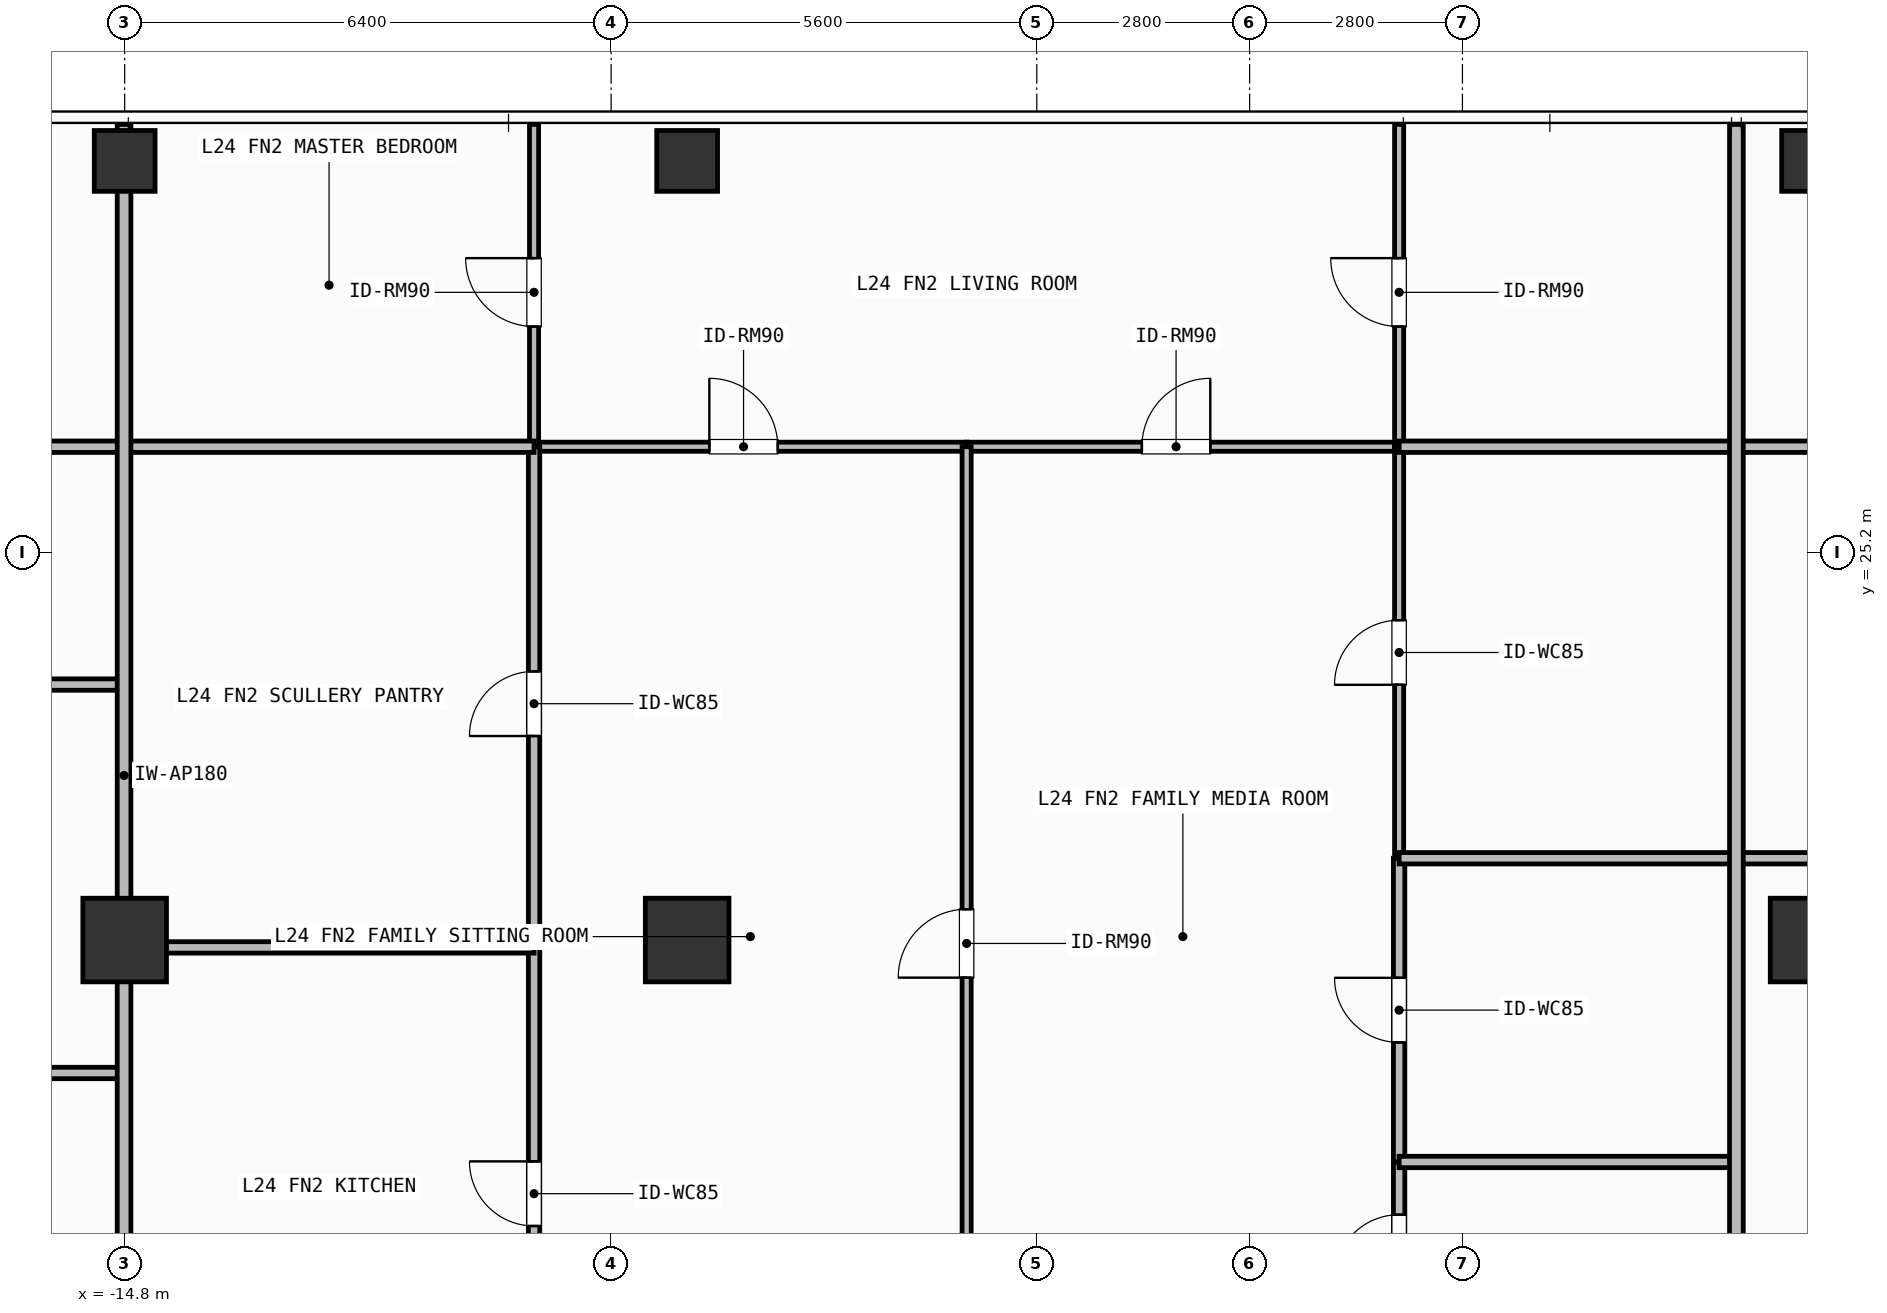
"""IFC4 building model, lengths in metres.
Left out: names, types, materials, properties, quantities, classifications, styles, units other than length and angle.
Written with IfcOpenShell. Run it as: python <this file> out.ifc"""

import sys

from ifc_helpers import new_model, si_unit, direction, frame, frame_2d, origin, origin_2d, place, context, subcontext, project, spatial, rectangle, hollow_rectangle, extrude, element, fill, save


model = new_model("IFC4")
c1 = context("Model", 3, precision=1e-05, world=origin(), true_north=direction((0.0, 1.0)))
c2 = subcontext(c1, "Body", "Model", "MODEL_VIEW")
j1 = project(units=[si_unit("LENGTHUNIT", "METRE"), si_unit("PLANEANGLEUNIT", "RADIAN")], contexts=[c1])
p1 = place(None, origin())
s1 = spatial("IfcSite", under=j1, at=p1, CompositionType="ELEMENT")
p2 = place(p1, origin())
s2 = spatial("IfcBuilding", under=s1, at=p2, CompositionType="ELEMENT")
p3 = place(p2, frame((0.0, 0.0, 96.9)))
s3 = spatial("IfcBuildingStorey", under=s2, at=p3, CompositionType="ELEMENT", Elevation=96.9)
for number, where, z_axis, x_axis in (
    (1, (-14.8, 20.1, 0.0), (0.0, 0.0, 1.0), (1.0, 0.0, 0.0)),
    (2, (-7.4, 20.1, 0.0), (0.0, 0.0, 1.0), (1.0, 0.0, 0.0)),
    (3, (7.4, 20.1, 0.0), (0.0, 0.0, 1.0), (1.0, 0.0, 0.0)),
):
    element("IfcColumn", number, at=place(p3, frame(where, z_axis=z_axis, x_axis=x_axis)), inside=s3, PredefinedType="COLUMN", context=c2, shape_type="SweptSolid", body=[
        extrude(rectangle(XDim=1.1, YDim=1.1, at=origin_2d()), origin(), (0.0, 0.0, 1.0), 3.9),
    ])
for number, where, z_axis, x_axis in (
    (4, (-14.8, 30.35, 0.0), (0.0, 0.0, 1.0), (1.0, 0.0, 0.0)),
    (5, (-7.4, 30.35, 0.0), (0.0, 0.0, 1.0), (1.0, 0.0, 0.0)),
    (6, (7.4, 30.35, 0.0), (0.0, 0.0, 1.0), (1.0, 0.0, 0.0)),
):
    element("IfcColumn", number, at=place(p3, frame(where, z_axis=z_axis, x_axis=x_axis)), inside=s3, PredefinedType="COLUMN", context=c2, shape_type="SweptSolid", body=[
        extrude(hollow_rectangle(XDim=0.8, YDim=0.8, WallThickness=0.036, at=origin_2d()), origin(), (0.0, 0.0, 1.0), 3.9),
    ])
p4 = place(p3, frame((-9.414, 26.59, 0.0), z_axis=(0.0, 0.0, 1.0), x_axis=(1.0, 0.0, 0.0)))
e7 = element("IfcWall", 7, at=p4, inside=s3, PredefinedType="PARTITIONING", context=c2, shape_type="SweptSolid", body=[
    extrude(rectangle(XDim=5.691, YDim=0.12, at=frame_2d((2.846, 0.0))), origin(), (0.0, 0.0, 1.0), 3.68),
])
p5 = place(p4, frame((2.306, 0.0, 0.0)))
e8 = element("IfcOpeningElement", 8, at=p5, cuts=e7, PredefinedType="OPENING", context=c2, shape_type="SweptSolid", body=[
    extrude(rectangle(XDim=0.9, YDim=2.1, at=frame_2d((0.45, 1.05))), frame((0.0, 0.07, 0.0), z_axis=(0.0, -1.0, 0.0), x_axis=(1.0, 0.0, 0.0)), (0.0, 0.0, 1.0), 0.14),
])
p6 = place(p3, frame((-3.723, 26.59, 0.0), z_axis=(0.0, 0.0, 1.0), x_axis=(1.0, 0.0, 0.0)))
e9 = element("IfcWall", 9, at=p6, inside=s3, PredefinedType="PARTITIONING", context=c2, shape_type="SweptSolid", body=[
    extrude(rectangle(XDim=5.69, YDim=0.12, at=frame_2d((2.845, 0.0))), origin(), (0.0, 0.0, 1.0), 3.68),
])
p7 = place(p6, frame((2.306, 0.0, 0.0)))
e10 = element("IfcOpeningElement", 10, at=p7, cuts=e9, PredefinedType="OPENING", context=c2, shape_type="SweptSolid", body=[
    extrude(rectangle(XDim=0.9, YDim=2.1, at=frame_2d((0.45, 1.05))), frame((0.0, 0.07, 0.0), z_axis=(0.0, -1.0, 0.0), x_axis=(1.0, 0.0, 0.0)), (0.0, 0.0, 1.0), 0.14),
])
p8 = place(p3, frame((-3.723, 13.7, 0.0), z_axis=(0.0, 0.0, 1.0), x_axis=(0.0, 1.0, 0.0)))
e11 = element("IfcWall", 11, at=p8, inside=s3, PredefinedType="PARTITIONING", context=c2, shape_type="SweptSolid", body=[
    extrude(rectangle(XDim=12.89, YDim=0.12, at=frame_2d((6.445, 0.0))), origin(), (0.0, 0.0, 1.0), 3.68),
])
p9 = place(p8, frame((5.905, 0.0, 0.0)))
e12 = element("IfcOpeningElement", 12, at=p9, cuts=e11, PredefinedType="OPENING", context=c2, shape_type="SweptSolid", body=[
    extrude(rectangle(XDim=0.9, YDim=2.1, at=frame_2d((0.45, 1.05))), frame((0.0, 0.07, 0.0), z_axis=(0.0, -1.0, 0.0), x_axis=(1.0, 0.0, 0.0)), (0.0, 0.0, 1.0), 0.14),
])
p10 = place(p3, frame((-9.414, 13.7, 0.0), z_axis=(0.0, 0.0, 1.0), x_axis=(0.0, 1.0, 0.0)))
e13 = element("IfcWall", 13, at=p10, inside=s3, PredefinedType="PARTITIONING", context=c2, shape_type="SweptSolid", body=[
    extrude(rectangle(XDim=6.303, YDim=0.15, at=frame_2d((3.151, 0.0))), origin(), (0.0, 0.0, 1.0), 3.68),
])
p11 = place(p10, frame((2.638, 0.0, 0.0)))
e14 = element("IfcOpeningElement", 14, at=p11, cuts=e13, PredefinedType="OPENING", context=c2, shape_type="SweptSolid", body=[
    extrude(rectangle(XDim=0.85, YDim=2.1, at=frame_2d((0.425, 1.05))), frame((0.0, 0.085, 0.0), z_axis=(0.0, -1.0, 0.0), x_axis=(1.0, 0.0, 0.0)), (0.0, 0.0, 1.0), 0.17),
])
p12 = place(p3, frame((-9.414, 20.003, 0.0), z_axis=(0.0, 0.0, 1.0), x_axis=(0.0, 1.0, 0.0)))
e15 = element("IfcWall", 15, at=p12, inside=s3, PredefinedType="PARTITIONING", context=c2, shape_type="SweptSolid", body=[
    extrude(rectangle(XDim=6.587, YDim=0.15, at=frame_2d((3.293, 0.0))), origin(), (0.0, 0.0, 1.0), 3.68),
])
p13 = place(p12, frame((2.781, 0.0, 0.0)))
e16 = element("IfcOpeningElement", 16, at=p13, cuts=e15, PredefinedType="OPENING", context=c2, shape_type="SweptSolid", body=[
    extrude(rectangle(XDim=0.85, YDim=2.1, at=frame_2d((0.425, 1.05))), frame((0.0, 0.085, 0.0), z_axis=(0.0, -1.0, 0.0), x_axis=(1.0, 0.0, 0.0)), (0.0, 0.0, 1.0), 0.17),
])
p14 = place(p3, frame((-9.414, 26.59, 0.0), z_axis=(0.0, 0.0, 1.0), x_axis=(0.0, 1.0, 0.0)))
e17 = element("IfcWall", 17, at=p14, inside=s3, PredefinedType="PARTITIONING", context=c2, shape_type="SweptSolid", body=[
    extrude(rectangle(XDim=4.24, YDim=0.12, at=frame_2d((2.12, 0.0))), origin(), (0.0, 0.0, 1.0), 3.68),
])
p15 = place(p14, frame((1.581, 0.0, 0.0)))
e18 = element("IfcOpeningElement", 18, at=p15, cuts=e17, PredefinedType="OPENING", context=c2, shape_type="SweptSolid", body=[
    extrude(rectangle(XDim=0.9, YDim=2.1, at=frame_2d((0.45, 1.05))), frame((0.0, 0.07, 0.0), z_axis=(0.0, -1.0, 0.0), x_axis=(1.0, 0.0, 0.0)), (0.0, 0.0, 1.0), 0.14),
])
p16 = place(p3, frame((1.967, 13.7, 0.0), z_axis=(0.0, 0.0, 1.0), x_axis=(0.0, 1.0, 0.0)))
e19 = element("IfcWall", 19, at=p16, inside=s3, PredefinedType="PARTITIONING", context=c2, shape_type="SweptSolid", body=[
    extrude(rectangle(XDim=3.48, YDim=0.15, at=frame_2d((1.74, 0.0))), origin(), (0.0, 0.0, 1.0), 3.68),
])
p17 = place(p16, frame((1.937, 0.0, 0.0)))
e20 = element("IfcOpeningElement", 20, at=p17, cuts=e19, PredefinedType="OPENING", context=c2, shape_type="SweptSolid", body=[
    extrude(rectangle(XDim=0.85, YDim=2.1, at=frame_2d((0.425, 1.05))), frame((0.0, 0.085, 0.0), z_axis=(0.0, -1.0, 0.0), x_axis=(1.0, 0.0, 0.0)), (0.0, 0.0, 1.0), 0.17),
])
p18 = place(p3, frame((1.967, 17.18, 0.0), z_axis=(0.0, 0.0, 1.0), x_axis=(0.0, 1.0, 0.0)))
e21 = element("IfcWall", 21, at=p18, inside=s3, PredefinedType="PARTITIONING", context=c2, shape_type="SweptSolid", body=[
    extrude(rectangle(XDim=3.996, YDim=0.15, at=frame_2d((1.998, 0.0))), origin(), (0.0, 0.0, 1.0), 3.68),
])
p19 = place(p18, frame((1.573, 0.0, 0.0)))
e22 = element("IfcOpeningElement", 22, at=p19, cuts=e21, PredefinedType="OPENING", context=c2, shape_type="SweptSolid", body=[
    extrude(rectangle(XDim=0.85, YDim=2.1, at=frame_2d((0.425, 1.05))), frame((0.0, 0.085, 0.0), z_axis=(0.0, -1.0, 0.0), x_axis=(1.0, 0.0, 0.0)), (0.0, 0.0, 1.0), 0.17),
])
p20 = place(p3, frame((1.967, 21.176, 0.0), z_axis=(0.0, 0.0, 1.0), x_axis=(0.0, 1.0, 0.0)))
e23 = element("IfcWall", 23, at=p20, inside=s3, PredefinedType="PARTITIONING", context=c2, shape_type="SweptSolid", body=[
    extrude(rectangle(XDim=5.414, YDim=0.12, at=frame_2d((2.707, 0.0))), origin(), (0.0, 0.0, 1.0), 3.68),
])
p21 = place(p20, frame((2.282, 0.0, 0.0)))
e24 = element("IfcOpeningElement", 24, at=p21, cuts=e23, PredefinedType="OPENING", context=c2, shape_type="SweptSolid", body=[
    extrude(rectangle(XDim=0.85, YDim=2.1, at=frame_2d((0.425, 1.05))), frame((0.0, 0.07, 0.0), z_axis=(0.0, -1.0, 0.0), x_axis=(1.0, 0.0, 0.0)), (0.0, 0.0, 1.0), 0.14),
])
p22 = place(p3, frame((1.967, 26.59, 0.0), z_axis=(0.0, 0.0, 1.0), x_axis=(0.0, 1.0, 0.0)))
e25 = element("IfcWall", 25, at=p22, inside=s3, PredefinedType="PARTITIONING", context=c2, shape_type="SweptSolid", body=[
    extrude(rectangle(XDim=4.24, YDim=0.12, at=frame_2d((2.12, 0.0))), origin(), (0.0, 0.0, 1.0), 3.68),
])
p23 = place(p22, frame((1.581, 0.0, 0.0)))
e26 = element("IfcOpeningElement", 26, at=p23, cuts=e25, PredefinedType="OPENING", context=c2, shape_type="SweptSolid", body=[
    extrude(rectangle(XDim=0.9, YDim=2.1, at=frame_2d((0.45, 1.05))), frame((0.0, 0.07, 0.0), z_axis=(0.0, -1.0, 0.0), x_axis=(1.0, 0.0, 0.0)), (0.0, 0.0, 1.0), 0.14),
])
for number, where, z_axis, x_axis in (
    (27, (-20.721, 18.351, 0.0), (0.0, 0.0, 1.0), (1.0, 0.0, 0.0)),
    (28, (-20.721, 23.461, 0.0), (0.0, 0.0, 1.0), (1.0, 0.0, 0.0)),
    (29, (-20.721, 26.59, 0.0), (0.0, 0.0, 1.0), (1.0, 0.0, 0.0)),
):
    element("IfcWall", number, at=place(p3, frame(where, z_axis=z_axis, x_axis=x_axis)), inside=s3, PredefinedType="PARTITIONING", context=c2, shape_type="SweptSolid", body=[
        extrude(rectangle(XDim=5.913, YDim=0.15, at=frame_2d((2.957, 0.0))), origin(), (0.0, 0.0, 1.0), 3.68),
    ])
p24 = place(p3, frame((-14.808, 20.003, 0.0), z_axis=(0.0, 0.0, 1.0), x_axis=(1.0, 0.0, 0.0)))
e30 = element("IfcWall", 30, at=p24, inside=s3, PredefinedType="PARTITIONING", context=c2, shape_type="SweptSolid", body=[
    extrude(rectangle(XDim=5.394, YDim=0.15, at=frame_2d((2.697, 0.0))), origin(), (0.0, 0.0, 1.0), 3.082),
])
p25 = place(p3, frame((-14.808, 26.59, 0.0), z_axis=(0.0, 0.0, 1.0), x_axis=(1.0, 0.0, 0.0)))
e31 = element("IfcWall", 31, at=p25, inside=s3, PredefinedType="PARTITIONING", context=c2, shape_type="SweptSolid", body=[
    extrude(rectangle(XDim=5.394, YDim=0.15, at=frame_2d((2.697, 0.0))), origin(), (0.0, 0.0, 1.0), 3.68),
])
for number, where, z_axis, x_axis in (
    (32, (1.967, 17.18, 0.0), (0.0, 0.0, 1.0), (1.0, 0.0, 0.0)),
    (33, (1.967, 21.176, 0.0), (0.0, 0.0, 1.0), (1.0, 0.0, 0.0)),
    (34, (1.967, 26.59, 0.0), (0.0, 0.0, 1.0), (1.0, 0.0, 0.0)),
):
    element("IfcWall", number, at=place(p3, frame(where, z_axis=z_axis, x_axis=x_axis)), inside=s3, PredefinedType="PARTITIONING", context=c2, shape_type="SweptSolid", body=[
        extrude(rectangle(XDim=4.437, YDim=0.15, at=frame_2d((2.219, 0.0))), origin(), (0.0, 0.0, 1.0), 3.68),
    ])
p26 = place(p3, frame((-14.808, 13.7, 0.0), z_axis=(0.0, 0.0, 1.0), x_axis=(0.0, 1.0, 0.0)))
e35 = element("IfcWall", 35, at=p26, inside=s3, PredefinedType="PARTITIONING", context=c2, shape_type="SweptSolid", body=[
    extrude(rectangle(XDim=17.13, YDim=0.18, at=frame_2d((8.565, 0.0))), origin(), (0.0, 0.0, 1.0), 3.082),
])
for number, where, z_axis, x_axis in (
    (36, (6.404, 21.176, 0.0), (0.0, 0.0, 1.0), (1.0, 0.0, 0.0)),
    (37, (6.404, 26.59, 0.0), (0.0, 0.0, 1.0), (1.0, 0.0, 0.0)),
):
    element("IfcWall", number, at=place(p3, frame(where, z_axis=z_axis, x_axis=x_axis)), inside=s3, PredefinedType="PARTITIONING", context=c2, shape_type="SweptSolid", body=[
        extrude(rectangle(XDim=4.129, YDim=0.15, at=frame_2d((2.064, 0.0))), origin(), (0.0, 0.0, 1.0), 3.68),
    ])
p27 = place(p3, frame((6.404, 13.7, 0.0), z_axis=(0.0, 0.0, 1.0), x_axis=(0.0, 1.0, 0.0)))
e38 = element("IfcWall", 38, at=p27, inside=s3, PredefinedType="PARTITIONING", context=c2, shape_type="SweptSolid", body=[
    extrude(rectangle(XDim=17.13, YDim=0.18, at=frame_2d((8.565, 0.0))), origin(), (0.0, 0.0, 1.0), 3.68),
])
p28 = place(p5, origin())
e39 = element("IfcDoor", 39, at=p28, inside=s3, OperationType="SINGLE_SWING_LEFT", PredefinedType="DOOR", context=c2, shape_type="SweptSolid", body=[
    extrude(rectangle(XDim=0.9, YDim=2.1, at=frame_2d((0.45, 1.05))), frame((0.0, 0.025, 0.0), z_axis=(0.0, -1.0, 0.0), x_axis=(1.0, 0.0, 0.0)), (0.0, 0.0, 1.0), 0.05),
])
fill(e8, e39)
p29 = place(p7, origin())
e40 = element("IfcDoor", 40, at=p29, inside=s3, OperationType="SINGLE_SWING_RIGHT", PredefinedType="DOOR", context=c2, shape_type="SweptSolid", body=[
    extrude(rectangle(XDim=0.9, YDim=2.1, at=frame_2d((0.45, 1.05))), frame((0.0, 0.025, 0.0), z_axis=(0.0, -1.0, 0.0), x_axis=(1.0, 0.0, 0.0)), (0.0, 0.0, 1.0), 0.05),
])
fill(e10, e40)
p30 = place(p9, origin())
e41 = element("IfcDoor", 41, at=p30, inside=s3, OperationType="SINGLE_SWING_LEFT", PredefinedType="DOOR", context=c2, shape_type="SweptSolid", body=[
    extrude(rectangle(XDim=0.9, YDim=2.1, at=frame_2d((0.45, 1.05))), frame((0.0, 0.025, 0.0), z_axis=(0.0, -1.0, 0.0), x_axis=(1.0, 0.0, 0.0)), (0.0, 0.0, 1.0), 0.05),
])
fill(e12, e41)
p31 = place(p11, origin())
e42 = element("IfcDoor", 42, at=p31, inside=s3, OperationType="SINGLE_SWING_RIGHT", PredefinedType="DOOR", context=c2, shape_type="SweptSolid", body=[
    extrude(rectangle(XDim=0.85, YDim=2.1, at=frame_2d((0.425, 1.05))), frame((0.0, 0.025, 0.0), z_axis=(0.0, -1.0, 0.0), x_axis=(1.0, 0.0, 0.0)), (0.0, 0.0, 1.0), 0.05),
])
fill(e14, e42)
p32 = place(p13, origin())
e43 = element("IfcDoor", 43, at=p32, inside=s3, OperationType="SINGLE_SWING_LEFT", PredefinedType="DOOR", context=c2, shape_type="SweptSolid", body=[
    extrude(rectangle(XDim=0.85, YDim=2.1, at=frame_2d((0.425, 1.05))), frame((0.0, 0.025, 0.0), z_axis=(0.0, -1.0, 0.0), x_axis=(1.0, 0.0, 0.0)), (0.0, 0.0, 1.0), 0.05),
])
fill(e16, e43)
p33 = place(p15, origin())
e44 = element("IfcDoor", 44, at=p33, inside=s3, OperationType="SINGLE_SWING_RIGHT", PredefinedType="DOOR", context=c2, shape_type="SweptSolid", body=[
    extrude(rectangle(XDim=0.9, YDim=2.1, at=frame_2d((0.45, 1.05))), frame((0.0, 0.025, 0.0), z_axis=(0.0, -1.0, 0.0), x_axis=(1.0, 0.0, 0.0)), (0.0, 0.0, 1.0), 0.05),
])
fill(e18, e44)
p34 = place(p17, origin())
e45 = element("IfcDoor", 45, at=p34, inside=s3, OperationType="SINGLE_SWING_LEFT", PredefinedType="DOOR", context=c2, shape_type="SweptSolid", body=[
    extrude(rectangle(XDim=0.85, YDim=2.1, at=frame_2d((0.425, 1.05))), frame((0.0, 0.025, 0.0), z_axis=(0.0, -1.0, 0.0), x_axis=(1.0, 0.0, 0.0)), (0.0, 0.0, 1.0), 0.05),
])
fill(e20, e45)
p35 = place(p19, origin())
e46 = element("IfcDoor", 46, at=p35, inside=s3, OperationType="SINGLE_SWING_RIGHT", PredefinedType="DOOR", context=c2, shape_type="SweptSolid", body=[
    extrude(rectangle(XDim=0.85, YDim=2.1, at=frame_2d((0.425, 1.05))), frame((0.0, 0.025, 0.0), z_axis=(0.0, -1.0, 0.0), x_axis=(1.0, 0.0, 0.0)), (0.0, 0.0, 1.0), 0.05),
])
fill(e22, e46)
p36 = place(p21, origin())
e47 = element("IfcDoor", 47, at=p36, inside=s3, OperationType="SINGLE_SWING_LEFT", PredefinedType="DOOR", context=c2, shape_type="SweptSolid", body=[
    extrude(rectangle(XDim=0.85, YDim=2.1, at=frame_2d((0.425, 1.05))), frame((0.0, 0.025, 0.0), z_axis=(0.0, -1.0, 0.0), x_axis=(1.0, 0.0, 0.0)), (0.0, 0.0, 1.0), 0.05),
])
fill(e24, e47)
p37 = place(p23, origin())
e48 = element("IfcDoor", 48, at=p37, inside=s3, OperationType="SINGLE_SWING_RIGHT", PredefinedType="DOOR", context=c2, shape_type="SweptSolid", body=[
    extrude(rectangle(XDim=0.9, YDim=2.1, at=frame_2d((0.45, 1.05))), frame((0.0, 0.025, 0.0), z_axis=(0.0, -1.0, 0.0), x_axis=(1.0, 0.0, 0.0)), (0.0, 0.0, 1.0), 0.05),
])
fill(e26, e48)
save(model, sys.argv[1])
